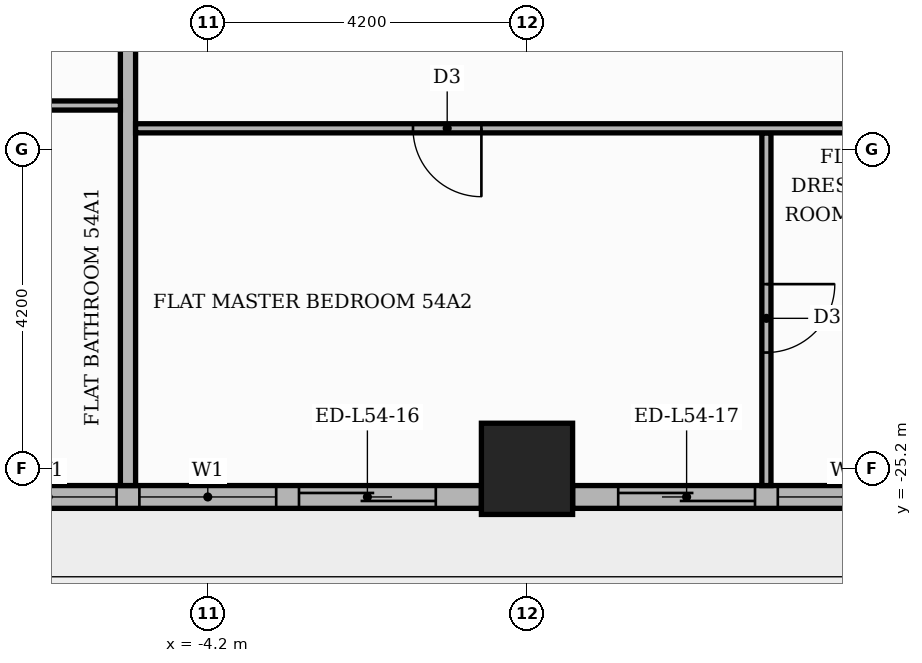
"""IFC4 building model, lengths in metres.
Left out: names, types, materials, properties, quantities, classifications, styles, units other than length and angle.
Written with IfcOpenShell. Run it as: python <this file> out.ifc"""

import sys

from ifc_helpers import new_model, si_unit, direction, frame, frame_2d, origin, origin_2d, place, context, subcontext, project, spatial, rectangle, extrude, element, fill, save


model = new_model("IFC4")
c1 = context("Model", 3, precision=1e-05, world=origin(), true_north=direction((0.0, 1.0)))
c2 = subcontext(c1, "Body", "Model", "MODEL_VIEW")
j1 = project(units=[si_unit("LENGTHUNIT", "METRE"), si_unit("PLANEANGLEUNIT", "RADIAN")], contexts=[c1])
p1 = place(None, origin())
s1 = spatial("IfcSite", under=j1, at=p1, CompositionType="ELEMENT")
p2 = place(p1, origin())
s2 = spatial("IfcBuilding", under=s1, at=p2, CompositionType="ELEMENT")
p3 = place(p2, frame((0.0, 0.0, 227.4)))
s3 = spatial("IfcBuildingStorey", under=s2, at=p3, CompositionType="ELEMENT", Elevation=227.4)
p4 = place(p3, frame((0.0, -25.2, 0.0), z_axis=(0.0, 0.0, 1.0), x_axis=(1.0, 0.0, 0.0)))
e1 = element("IfcColumn", 1, at=p4, inside=s3, PredefinedType="COLUMN", context=c2, shape_type="SweptSolid", body=[
    extrude(rectangle(XDim=1.2, YDim=1.2, at=origin_2d()), origin(), (0.0, 0.0, 1.0), 3.9),
])
p5 = place(p3, frame((-7.8, -25.57, 0.0), z_axis=(0.0, 0.0, 1.0), x_axis=(1.0, 0.0, 0.0)))
e2 = element("IfcWall", 2, at=p5, inside=s3, PredefinedType="STANDARD", context=c2, shape_type="SweptSolid", body=[
    extrude(rectangle(XDim=7.2, YDim=0.3, at=frame_2d((3.6, 0.0))), origin(), (0.0, 0.0, 1.0), 3.48),
])
p6 = place(p5, frame((0.6, 0.0, 0.9)))
e3 = element("IfcOpeningElement", 3, at=p6, cuts=e2, PredefinedType="OPENING", context=c2, shape_type="SweptSolid", body=[
    extrude(rectangle(XDim=1.8, YDim=2.1, at=frame_2d((0.9, 1.05))), frame((0.0, 0.16, 0.0), z_axis=(0.0, -1.0, 0.0), x_axis=(1.0, 0.0, 0.0)), (0.0, 0.0, 1.0), 0.32),
])
p7 = place(p5, frame((2.7, 0.0, 0.9)))
e4 = element("IfcOpeningElement", 4, at=p7, cuts=e2, PredefinedType="OPENING", context=c2, shape_type="SweptSolid", body=[
    extrude(rectangle(XDim=1.8, YDim=2.1, at=frame_2d((0.9, 1.05))), frame((0.0, 0.16, 0.0), z_axis=(0.0, -1.0, 0.0), x_axis=(1.0, 0.0, 0.0)), (0.0, 0.0, 1.0), 0.32),
])
p8 = place(p5, frame((4.8, 0.0, 0.0)))
e5 = element("IfcOpeningElement", 5, at=p8, cuts=e2, PredefinedType="OPENING", context=c2, shape_type="SweptSolid", body=[
    extrude(rectangle(XDim=1.8, YDim=2.4, at=frame_2d((0.9, 1.2))), frame((0.0, 0.16, 0.0), z_axis=(0.0, -1.0, 0.0), x_axis=(1.0, 0.0, 0.0)), (0.0, 0.0, 1.0), 0.32),
])
p9 = place(p3, frame((0.6, -25.57, 0.0), z_axis=(0.0, 0.0, 1.0), x_axis=(1.0, 0.0, 0.0)))
e6 = element("IfcWall", 6, at=p9, inside=s3, PredefinedType="STANDARD", context=c2, shape_type="SweptSolid", body=[
    extrude(rectangle(XDim=7.2, YDim=0.3, at=frame_2d((3.6, 0.0))), origin(), (0.0, 0.0, 1.0), 3.48),
])
p10 = place(p9, frame((0.6, 0.0, 0.0)))
e7 = element("IfcOpeningElement", 7, at=p10, cuts=e6, PredefinedType="OPENING", context=c2, shape_type="SweptSolid", body=[
    extrude(rectangle(XDim=1.8, YDim=2.4, at=frame_2d((0.9, 1.2))), frame((0.0, 0.16, 0.0), z_axis=(0.0, -1.0, 0.0), x_axis=(1.0, 0.0, 0.0)), (0.0, 0.0, 1.0), 0.32),
])
p11 = place(p9, frame((2.7, 0.0, 0.9)))
e8 = element("IfcOpeningElement", 8, at=p11, cuts=e6, PredefinedType="OPENING", context=c2, shape_type="SweptSolid", body=[
    extrude(rectangle(XDim=1.8, YDim=2.1, at=frame_2d((0.9, 1.05))), frame((0.0, 0.16, 0.0), z_axis=(0.0, -1.0, 0.0), x_axis=(1.0, 0.0, 0.0)), (0.0, 0.0, 1.0), 0.32),
])
p12 = place(p9, frame((4.8, 0.0, 0.9)))
e9 = element("IfcOpeningElement", 9, at=p12, cuts=e6, PredefinedType="OPENING", context=c2, shape_type="SweptSolid", body=[
    extrude(rectangle(XDim=1.8, YDim=2.1, at=frame_2d((0.9, 1.05))), frame((0.0, 0.16, 0.0), z_axis=(0.0, -1.0, 0.0), x_axis=(1.0, 0.0, 0.0)), (0.0, 0.0, 1.0), 0.32),
])
p13 = place(p3, frame((-5.25, -25.42, 0.0), z_axis=(0.0, 0.0, 1.0), x_axis=(0.0, 1.0, 0.0)))
e10 = element("IfcWall", 10, at=p13, inside=s3, PredefinedType="PARTITIONING", context=c2, shape_type="SweptSolid", body=[
    extrude(rectangle(XDim=11.67, YDim=0.2, at=frame_2d((5.835, 0.0))), origin(), (0.0, 0.0, 1.0), 3.48),
])
p14 = place(p3, frame((3.15, -25.42, 0.0), z_axis=(0.0, 0.0, 1.0), x_axis=(0.0, 1.0, 0.0)))
e11 = element("IfcWall", 11, at=p14, inside=s3, PredefinedType="PARTITIONING", context=c2, shape_type="SweptSolid", body=[
    extrude(rectangle(XDim=4.64, YDim=0.12, at=frame_2d((2.32, 0.0))), origin(), (0.0, 0.0, 1.0), 3.48),
])
p15 = place(p14, frame((1.75, 0.0, 0.0)))
e12 = element("IfcOpeningElement", 12, at=p15, cuts=e11, PredefinedType="OPENING", context=c2, shape_type="SweptSolid", body=[
    extrude(rectangle(XDim=0.9, YDim=2.1, at=frame_2d((0.45, 1.05))), frame((0.0, 0.07, 0.0), z_axis=(0.0, -1.0, 0.0), x_axis=(1.0, 0.0, 0.0)), (0.0, 0.0, 1.0), 0.14),
])
p16 = place(p3, frame((-5.15, -20.72, 0.0), z_axis=(0.0, 0.0, 1.0), x_axis=(1.0, 0.0, 0.0)))
e13 = element("IfcWall", 13, at=p16, inside=s3, PredefinedType="PARTITIONING", context=c2, shape_type="SweptSolid", body=[
    extrude(rectangle(XDim=18.7, YDim=0.12, at=frame_2d((9.35, 0.0))), origin(), (0.0, 0.0, 1.0), 3.48),
])
p17 = place(p16, frame((3.65, 0.0, 0.0)))
e14 = element("IfcOpeningElement", 14, at=p17, cuts=e13, PredefinedType="OPENING", context=c2, shape_type="SweptSolid", body=[
    extrude(rectangle(XDim=0.9, YDim=2.1, at=frame_2d((0.45, 1.05))), frame((0.0, 0.07, 0.0), z_axis=(0.0, -1.0, 0.0), x_axis=(1.0, 0.0, 0.0)), (0.0, 0.0, 1.0), 0.14),
])
p18 = place(p16, frame((15.15, 0.0, 0.0)))
e15 = element("IfcOpeningElement", 15, at=p18, cuts=e13, PredefinedType="OPENING", context=c2, shape_type="SweptSolid", body=[
    extrude(rectangle(XDim=1.0, YDim=2.1, at=frame_2d((0.5, 1.05))), frame((0.0, 0.07, 0.0), z_axis=(0.0, -1.0, 0.0), x_axis=(1.0, 0.0, 0.0)), (0.0, 0.0, 1.0), 0.14),
])
p19 = place(p3, frame((-21.219, -20.42, 0.0), z_axis=(0.0, 0.0, 1.0), x_axis=(1.0, 0.0, 0.0)))
e16 = element("IfcWall", 16, at=p19, inside=s3, PredefinedType="PARTITIONING", context=c2, shape_type="SweptSolid", body=[
    extrude(rectangle(XDim=15.869, YDim=0.12, at=frame_2d((7.935, 0.0))), origin(), (0.0, 0.0, 1.0), 3.48),
])
p20 = place(p19, frame((6.019, 0.0, 0.0)))
e17 = element("IfcOpeningElement", 17, at=p20, cuts=e16, PredefinedType="OPENING", context=c2, shape_type="SweptSolid", body=[
    extrude(rectangle(XDim=1.0, YDim=2.1, at=frame_2d((0.5, 1.05))), frame((0.0, 0.07, 0.0), z_axis=(0.0, -1.0, 0.0), x_axis=(1.0, 0.0, 0.0)), (0.0, 0.0, 1.0), 0.14),
])
p21 = place(p19, frame((9.219, 0.0, 0.0)))
e18 = element("IfcOpeningElement", 18, at=p21, cuts=e16, PredefinedType="OPENING", context=c2, shape_type="SweptSolid", body=[
    extrude(rectangle(XDim=0.9, YDim=2.1, at=frame_2d((0.45, 1.05))), frame((0.0, 0.07, 0.0), z_axis=(0.0, -1.0, 0.0), x_axis=(1.0, 0.0, 0.0)), (0.0, 0.0, 1.0), 0.14),
])
p22 = place(p6, origin())
e19 = element("IfcWindow", 19, at=p22, inside=s3, PartitioningType="SINGLE_PANEL", PredefinedType="WINDOW", context=c2, shape_type="SweptSolid", body=[
    extrude(rectangle(XDim=1.8, YDim=2.1, at=frame_2d((0.9, 1.05))), frame((0.0, 0.03, 0.0), z_axis=(0.0, -1.0, 0.0), x_axis=(1.0, 0.0, 0.0)), (0.0, 0.0, 1.0), 0.06),
])
fill(e3, e19)
p23 = place(p7, origin())
e20 = element("IfcWindow", 20, at=p23, inside=s3, PartitioningType="SINGLE_PANEL", PredefinedType="WINDOW", context=c2, shape_type="SweptSolid", body=[
    extrude(rectangle(XDim=1.8, YDim=2.1, at=frame_2d((0.9, 1.05))), frame((0.0, 0.03, 0.0), z_axis=(0.0, -1.0, 0.0), x_axis=(1.0, 0.0, 0.0)), (0.0, 0.0, 1.0), 0.06),
])
fill(e4, e20)
p24 = place(p8, origin())
e21 = element("IfcDoor", 21, at=p24, inside=s3, OperationType="SLIDING_TO_RIGHT", PredefinedType="DOOR", context=c2, shape_type="SweptSolid", body=[
    extrude(rectangle(XDim=1.8, YDim=2.4, at=frame_2d((0.9, 1.2))), frame((0.0, 0.025, 0.0), z_axis=(0.0, -1.0, 0.0), x_axis=(1.0, 0.0, 0.0)), (0.0, 0.0, 1.0), 0.05),
])
fill(e5, e21)
p25 = place(p10, origin())
e22 = element("IfcDoor", 22, at=p25, inside=s3, OperationType="SLIDING_TO_LEFT", PredefinedType="DOOR", context=c2, shape_type="SweptSolid", body=[
    extrude(rectangle(XDim=1.8, YDim=2.4, at=frame_2d((0.9, 1.2))), frame((0.0, 0.025, 0.0), z_axis=(0.0, -1.0, 0.0), x_axis=(1.0, 0.0, 0.0)), (0.0, 0.0, 1.0), 0.05),
])
fill(e7, e22)
p26 = place(p11, origin())
e23 = element("IfcWindow", 23, at=p26, inside=s3, PartitioningType="SINGLE_PANEL", PredefinedType="WINDOW", context=c2, shape_type="SweptSolid", body=[
    extrude(rectangle(XDim=1.8, YDim=2.1, at=frame_2d((0.9, 1.05))), frame((0.0, 0.03, 0.0), z_axis=(0.0, -1.0, 0.0), x_axis=(1.0, 0.0, 0.0)), (0.0, 0.0, 1.0), 0.06),
])
fill(e8, e23)
p27 = place(p17, frame((0.9, 0.0, 0.0), z_axis=(0.0, 0.0, 1.0), x_axis=(-1.0, 0.0, 0.0)))
e24 = element("IfcDoor", 24, at=p27, inside=s3, OperationType="SINGLE_SWING_RIGHT", PredefinedType="DOOR", context=c2, shape_type="SweptSolid", body=[
    extrude(rectangle(XDim=0.9, YDim=2.1, at=frame_2d((0.45, 1.05))), frame((0.0, 0.025, 0.0), z_axis=(0.0, -1.0, 0.0), x_axis=(1.0, 0.0, 0.0)), (0.0, 0.0, 1.0), 0.05),
])
fill(e14, e24)
p28 = place(p15, frame((0.9, 0.0, 0.0), z_axis=(0.0, 0.0, 1.0), x_axis=(-1.0, 0.0, 0.0)))
e25 = element("IfcDoor", 25, at=p28, inside=s3, OperationType="SINGLE_SWING_RIGHT", PredefinedType="DOOR", context=c2, shape_type="SweptSolid", body=[
    extrude(rectangle(XDim=0.9, YDim=2.1, at=frame_2d((0.45, 1.05))), frame((0.0, 0.025, 0.0), z_axis=(0.0, -1.0, 0.0), x_axis=(1.0, 0.0, 0.0)), (0.0, 0.0, 1.0), 0.05),
])
fill(e12, e25)
save(model, sys.argv[1])
